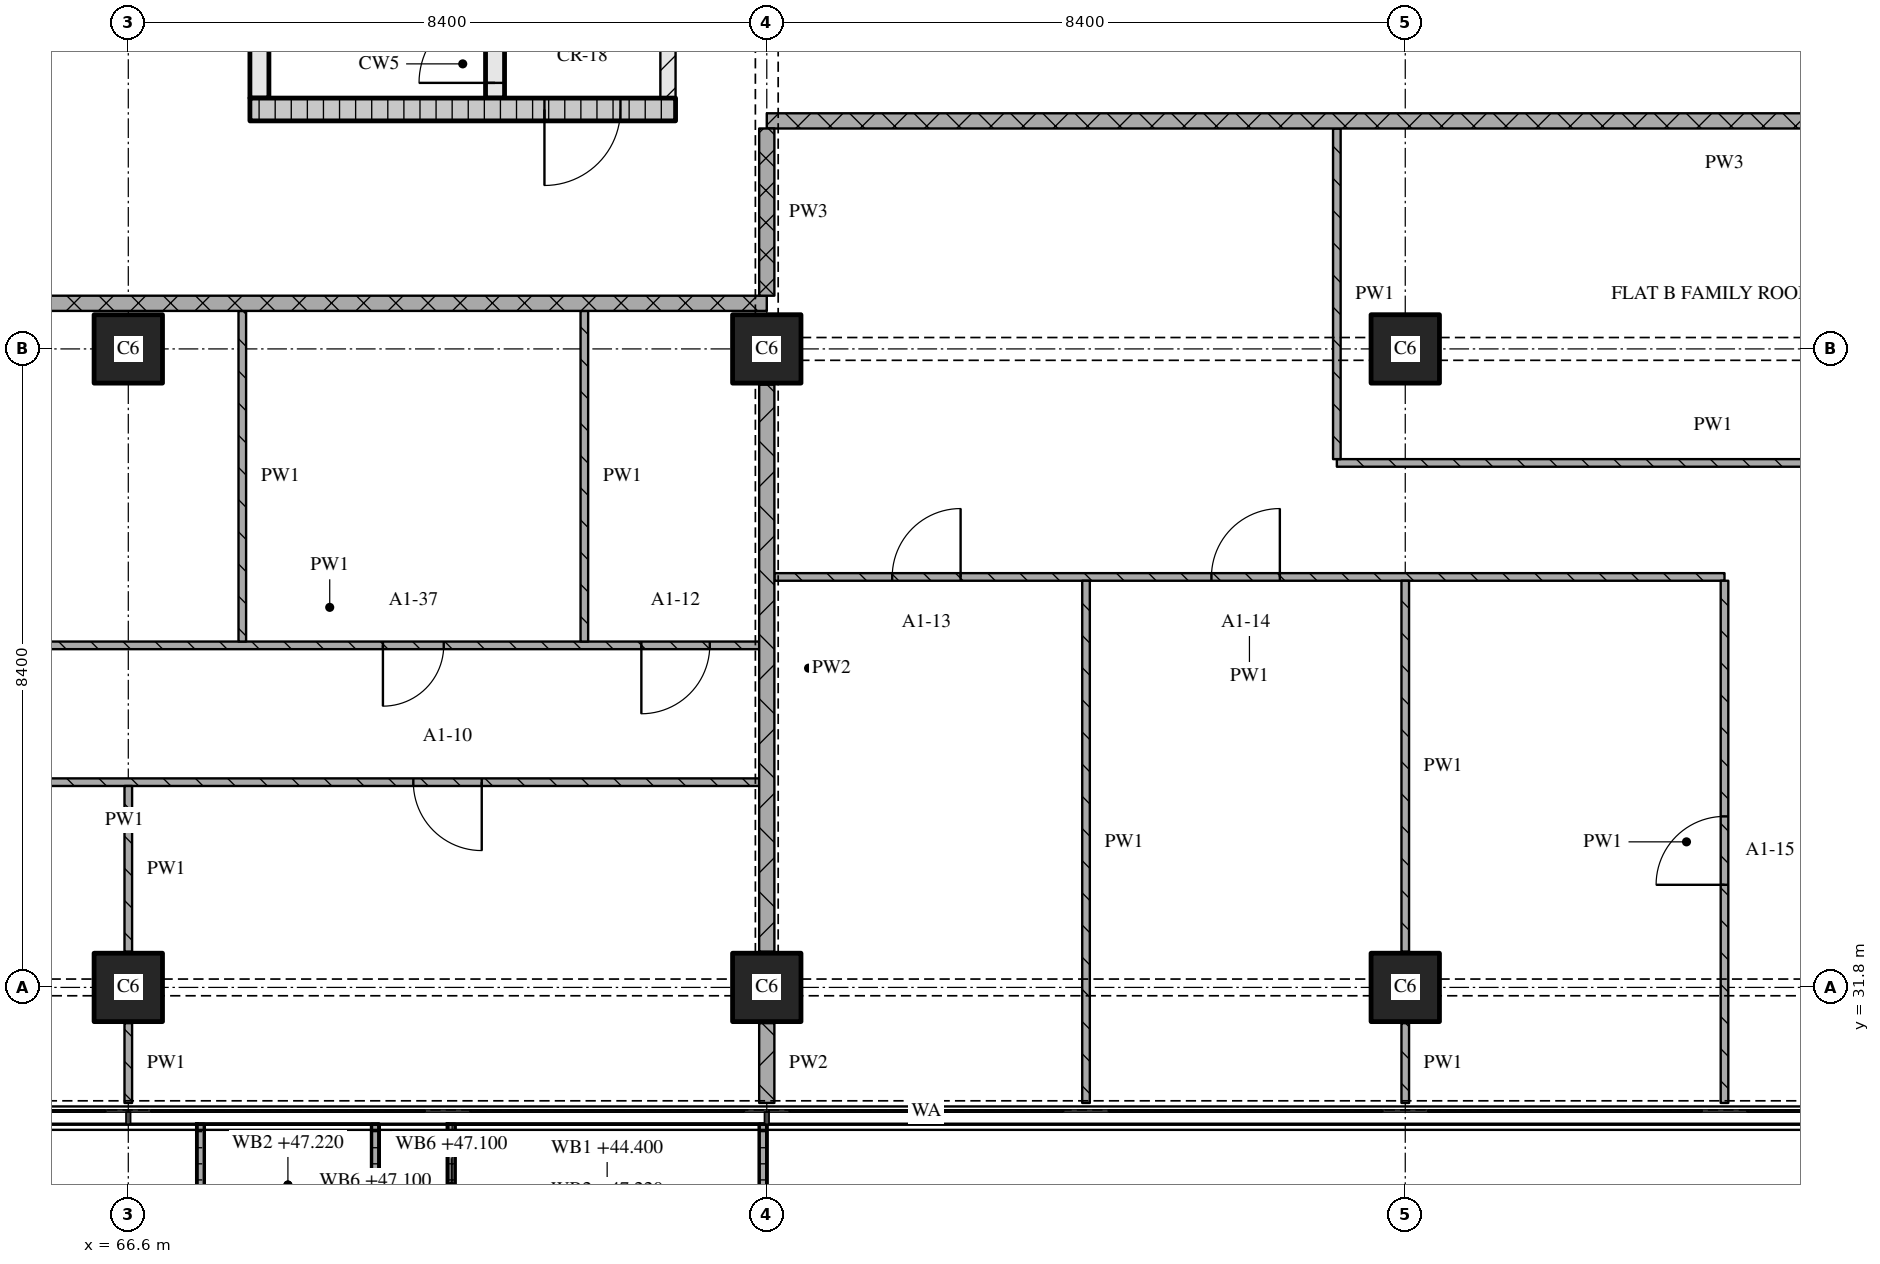
"""IFC4 building model, lengths in metres.
Left out: names, types, materials, properties, quantities, classifications, styles, units other than length and angle.
Written with IfcOpenShell. Run it as: python <this file> out.ifc"""

import sys

from ifc_helpers import new_model, si_unit, direction, frame, frame_2d, origin, origin_2d, place, context, subcontext, project, spatial, polyline, rectangle, outline, extrude, element, fill, save


model = new_model("IFC4")
c1 = context("Model", 3, precision=1e-05, world=origin(), true_north=direction((0.0, 1.0)))
c2 = subcontext(c1, "Body", "Model", "MODEL_VIEW")
j1 = project(units=[si_unit("LENGTHUNIT", "METRE"), si_unit("PLANEANGLEUNIT", "RADIAN")], contexts=[c1])
p1 = place(None, origin())
s1 = spatial("IfcSite", under=j1, at=p1, CompositionType="ELEMENT")
p2 = place(p1, origin())
s2 = spatial("IfcBuilding", under=s1, at=p2, CompositionType="ELEMENT")
p3 = place(p2, frame((0.0, 0.0, 44.4)))
s3 = spatial("IfcBuildingStorey", under=s2, at=p3, CompositionType="ELEMENT", Elevation=44.4)
for number, where, z_axis, x_axis in (
    (1, (66.6, 31.8, 0.0), (0.0, 0.0, 1.0), (1.0, 0.0, 0.0)),
    (2, (66.6, 40.2, 0.0), (0.0, 0.0, 1.0), (1.0, 0.0, 0.0)),
    (3, (75.0, 31.8, 0.0), (0.0, 0.0, 1.0), (1.0, 0.0, 0.0)),
    (4, (75.0, 40.2, 0.0), (0.0, 0.0, 1.0), (1.0, 0.0, 0.0)),
    (5, (83.4, 31.8, 0.0), (0.0, 0.0, 1.0), (1.0, 0.0, 0.0)),
    (6, (83.4, 40.2, 0.0), (0.0, 0.0, 1.0), (1.0, 0.0, 0.0)),
):
    element("IfcColumn", number, at=place(p3, frame(where, z_axis=z_axis, x_axis=x_axis)), inside=s3, PredefinedType="COLUMN", context=c2, shape_type="SweptSolid", body=[
        extrude(rectangle(XDim=0.9, YDim=0.9, at=origin_2d()), origin(), (0.0, 0.0, 1.0), 3.6),
    ])
p4 = place(p3, origin())
e7 = element("IfcWall", 7, at=p4, inside=s3, PredefinedType="SOLIDWALL", context=c2, shape_type="SweptSolid", body=[
    extrude(outline(polyline([(67.5, 30.0), (67.6, 30.0), (67.6, 28.5), (69.8, 28.5), (69.8, 30.0), (69.9, 30.0), (69.9, 28.4), (67.5, 28.4), (67.5, 30.0)])), origin(), (0.0, 0.0, 1.0), 1.0),
])
p5 = place(p3, origin())
e8 = element("IfcWall", 8, at=p5, inside=s3, PredefinedType="SOLIDWALL", context=c2, shape_type="SweptSolid", body=[
    extrude(outline(polyline([(70.8, 30.0), (70.9, 30.0), (70.9, 28.367), (74.9, 28.367), (74.9, 30.0), (75.0, 30.0), (75.0, 28.267), (70.8, 28.267), (70.8, 30.0)])), origin(), (0.0, 0.0, 1.0), 1.0),
])
p6 = place(p3, frame((68.2, 43.35, 0.0), z_axis=(0.0, 0.0, 1.0), x_axis=(1.0, 0.0, 0.0)))
e9 = element("IfcWall", 9, at=p6, inside=s3, PredefinedType="SOLIDWALL", context=c2, shape_type="SweptSolid", body=[
    extrude(rectangle(XDim=5.6, YDim=0.3, at=frame_2d((2.8, 0.0))), origin(), (0.0, 0.0, 1.0), 3.32),
])
p7 = place(p6, frame((3.875, 0.0, 0.0)))
e10 = element("IfcOpeningElement", 10, at=p7, cuts=e9, PredefinedType="OPENING", context=c2, shape_type="SweptSolid", body=[
    extrude(rectangle(XDim=1.0, YDim=2.1, at=frame_2d((0.5, 1.05))), frame((0.0, 0.16, 0.0), z_axis=(0.0, -1.0, 0.0), x_axis=(1.0, 0.0, 0.0)), (0.0, 0.0, 1.0), 0.32),
])
p8 = place(p3, frame((68.325, 43.5, 0.0), z_axis=(0.0, 0.0, 1.0), x_axis=(0.0, 1.0, 0.0)))
e11 = element("IfcWall", 11, at=p8, inside=s3, PredefinedType="SOLIDWALL", context=c2, shape_type="SweptSolid", body=[
    extrude(rectangle(XDim=6.9, YDim=0.25, at=frame_2d((3.45, 0.0))), origin(), (0.0, 0.0, 1.0), 3.32),
])
p9 = place(p3, frame((71.425, 43.5, 0.0), z_axis=(0.0, 0.0, 1.0), x_axis=(0.0, 1.0, 0.0)))
e12 = element("IfcWall", 12, at=p9, inside=s3, PredefinedType="SOLIDWALL", context=c2, shape_type="SweptSolid", body=[
    extrude(rectangle(XDim=6.9, YDim=0.25, at=frame_2d((3.45, 0.0))), origin(), (0.0, 0.0, 1.0), 3.32),
])
p10 = place(p9, frame((0.2, 0.0, 0.0)))
e13 = element("IfcOpeningElement", 13, at=p10, cuts=e12, PredefinedType="OPENING", context=c2, shape_type="SweptSolid", body=[
    extrude(rectangle(XDim=1.0, YDim=2.1, at=frame_2d((0.5, 1.05))), frame((0.0, 0.135, 0.0), z_axis=(0.0, -1.0, 0.0), x_axis=(1.0, 0.0, 0.0)), (0.0, 0.0, 1.0), 0.27),
])
p11 = place(p3, frame((73.7, 43.5, 0.0), z_axis=(0.0, 0.0, 1.0), x_axis=(0.0, 1.0, 0.0)))
e14 = element("IfcWall", 14, at=p11, inside=s3, PredefinedType="PARTITIONING", context=c2, shape_type="SweptSolid", body=[
    extrude(rectangle(XDim=6.9, YDim=0.2, at=frame_2d((3.45, 0.0))), origin(), (0.0, 0.0, 1.0), 3.32),
])
p12 = place(p11, frame((1.0, 0.0, 0.0)))
e15 = element("IfcOpeningElement", 15, at=p12, cuts=e14, PredefinedType="OPENING", context=c2, shape_type="SweptSolid", body=[
    extrude(rectangle(XDim=1.0, YDim=2.1, at=frame_2d((0.5, 1.05))), frame((0.0, 0.11, 0.0), z_axis=(0.0, -1.0, 0.0), x_axis=(1.0, 0.0, 0.0)), (0.0, 0.0, 1.0), 0.22),
])
p13 = place(p3, frame((74.9, 34.5, 0.0), z_axis=(0.0, 0.0, 1.0), x_axis=(-1.0, 0.0, 0.0)))
e16 = element("IfcWall", 16, at=p13, inside=s3, PredefinedType="PARTITIONING", context=c2, shape_type="SweptSolid", body=[
    extrude(rectangle(XDim=16.7, YDim=0.1, at=frame_2d((8.35, 0.0))), origin(), (0.0, 0.0, 1.0), 3.32),
])
p14 = place(p13, frame((3.65, 0.0, 0.0)))
e17 = element("IfcOpeningElement", 17, at=p14, cuts=e16, PredefinedType="OPENING", context=c2, shape_type="SweptSolid", body=[
    extrude(rectangle(XDim=0.9, YDim=2.1, at=frame_2d((0.45, 1.05))), frame((0.0, 0.06, 0.0), z_axis=(0.0, -1.0, 0.0), x_axis=(1.0, 0.0, 0.0)), (0.0, 0.0, 1.0), 0.12),
])
p15 = place(p13, frame((12.05, 0.0, 0.0)))
e18 = element("IfcOpeningElement", 18, at=p15, cuts=e16, PredefinedType="OPENING", context=c2, shape_type="SweptSolid", body=[
    extrude(rectangle(XDim=0.9, YDim=2.1, at=frame_2d((0.45, 1.05))), frame((0.0, 0.06, 0.0), z_axis=(0.0, -1.0, 0.0), x_axis=(1.0, 0.0, 0.0)), (0.0, 0.0, 1.0), 0.12),
])
p16 = place(p3, frame((63.6, 36.3, 0.0), z_axis=(0.0, 0.0, 1.0), x_axis=(1.0, 0.0, 0.0)))
e19 = element("IfcWall", 19, at=p16, inside=s3, PredefinedType="PARTITIONING", context=c2, shape_type="SweptSolid", body=[
    extrude(rectangle(XDim=11.3, YDim=0.1, at=frame_2d((5.65, 0.0))), origin(), (0.0, 0.0, 1.0), 3.32),
])
p17 = place(p16, frame((6.35, 0.0, 0.0)))
e20 = element("IfcOpeningElement", 20, at=p17, cuts=e19, PredefinedType="OPENING", context=c2, shape_type="SweptSolid", body=[
    extrude(rectangle(XDim=0.8, YDim=2.1, at=frame_2d((0.4, 1.05))), frame((0.0, 0.06, 0.0), z_axis=(0.0, -1.0, 0.0), x_axis=(1.0, 0.0, 0.0)), (0.0, 0.0, 1.0), 0.12),
])
p18 = place(p16, frame((9.75, 0.0, 0.0)))
e21 = element("IfcOpeningElement", 21, at=p18, cuts=e19, PredefinedType="OPENING", context=c2, shape_type="SweptSolid", body=[
    extrude(rectangle(XDim=0.9, YDim=2.1, at=frame_2d((0.45, 1.05))), frame((0.0, 0.06, 0.0), z_axis=(0.0, -1.0, 0.0), x_axis=(1.0, 0.0, 0.0)), (0.0, 0.0, 1.0), 0.12),
])
p19 = place(p3, frame((87.6, 37.2, 0.0), z_axis=(0.0, 0.0, 1.0), x_axis=(-1.0, 0.0, 0.0)))
e22 = element("IfcWall", 22, at=p19, inside=s3, PredefinedType="PARTITIONING", context=c2, shape_type="SweptSolid", body=[
    extrude(rectangle(XDim=12.5, YDim=0.1, at=frame_2d((6.25, 0.0))), origin(), (0.0, 0.0, 1.0), 3.32),
])
p20 = place(p19, frame((5.85, 0.0, 0.0)))
e23 = element("IfcOpeningElement", 23, at=p20, cuts=e22, PredefinedType="OPENING", context=c2, shape_type="SweptSolid", body=[
    extrude(rectangle(XDim=0.9, YDim=2.1, at=frame_2d((0.45, 1.05))), frame((0.0, 0.06, 0.0), z_axis=(0.0, -1.0, 0.0), x_axis=(1.0, 0.0, 0.0)), (0.0, 0.0, 1.0), 0.12),
])
p21 = place(p19, frame((10.05, 0.0, 0.0)))
e24 = element("IfcOpeningElement", 24, at=p21, cuts=e22, PredefinedType="OPENING", context=c2, shape_type="SweptSolid", body=[
    extrude(rectangle(XDim=0.9, YDim=2.1, at=frame_2d((0.45, 1.05))), frame((0.0, 0.06, 0.0), z_axis=(0.0, -1.0, 0.0), x_axis=(1.0, 0.0, 0.0)), (0.0, 0.0, 1.0), 0.12),
])
p22 = place(p3, frame((82.5, 38.7, 0.0), z_axis=(0.0, 0.0, 1.0), x_axis=(1.0, 0.0, 0.0)))
e25 = element("IfcWall", 25, at=p22, inside=s3, PredefinedType="PARTITIONING", context=c2, shape_type="SweptSolid", body=[
    extrude(rectangle(XDim=9.9, YDim=0.1, at=frame_2d((4.95, 0.0))), origin(), (0.0, 0.0, 1.0), 3.32),
])
p23 = place(p3, frame((75.0, 40.8, 0.0), z_axis=(0.0, 0.0, 1.0), x_axis=(-1.0, 0.0, 0.0)))
e26 = element("IfcWall", 26, at=p23, inside=s3, PredefinedType="PARTITIONING", context=c2, shape_type="SweptSolid", body=[
    extrude(rectangle(XDim=24.08, YDim=0.2, at=frame_2d((12.04, 0.0))), origin(), (0.0, 0.0, 1.0), 3.32),
])
p24 = place(p23, frame((11.65, 0.0, 0.0)))
e27 = element("IfcOpeningElement", 27, at=p24, cuts=e26, PredefinedType="OPENING", context=c2, shape_type="SweptSolid", body=[
    extrude(rectangle(XDim=1.0, YDim=2.1, at=frame_2d((0.5, 1.05))), frame((0.0, 0.11, 0.0), z_axis=(0.0, -1.0, 0.0), x_axis=(1.0, 0.0, 0.0)), (0.0, 0.0, 1.0), 0.22),
])
p25 = place(p3, frame((100.2, 43.2, 0.0), z_axis=(0.0, 0.0, 1.0), x_axis=(-1.0, 0.0, 0.0)))
e28 = element("IfcWall", 28, at=p25, inside=s3, PredefinedType="PARTITIONING", context=c2, shape_type="SweptSolid", body=[
    extrude(rectangle(XDim=25.2, YDim=0.2, at=frame_2d((12.6, 0.0))), origin(), (0.0, 0.0, 1.0), 3.32),
])
p26 = place(p25, frame((6.55, 0.0, 0.0)))
e29 = element("IfcOpeningElement", 29, at=p26, cuts=e28, PredefinedType="OPENING", context=c2, shape_type="SweptSolid", body=[
    extrude(rectangle(XDim=1.0, YDim=2.1, at=frame_2d((0.5, 1.05))), frame((0.0, 0.11, 0.0), z_axis=(0.0, -1.0, 0.0), x_axis=(1.0, 0.0, 0.0)), (0.0, 0.0, 1.0), 0.22),
])
p27 = place(p3, frame((66.6, 31.33, 0.0), z_axis=(0.0, 0.0, 1.0), x_axis=(0.0, -1.0, 0.0)))
e30 = element("IfcWall", 30, at=p27, inside=s3, PredefinedType="PARTITIONING", context=c2, shape_type="SweptSolid", body=[
    extrude(rectangle(XDim=1.05, YDim=0.1, at=frame_2d((0.525, 0.0))), origin(), (0.0, 0.0, 1.0), 3.32),
])
p28 = place(p3, frame((66.6, 34.45, 0.0), z_axis=(0.0, 0.0, 1.0), x_axis=(0.0, -1.0, 0.0)))
e31 = element("IfcWall", 31, at=p28, inside=s3, PredefinedType="PARTITIONING", context=c2, shape_type="SweptSolid", body=[
    extrude(rectangle(XDim=2.18, YDim=0.1, at=frame_2d((1.09, 0.0))), origin(), (0.0, 0.0, 1.0), 3.32),
])
for number, where, z_axis, x_axis in (
    (32, (68.1, 40.7, 0.0), (0.0, 0.0, 1.0), (0.0, -1.0, 0.0)),
    (33, (72.6, 40.7, 0.0), (0.0, 0.0, 1.0), (0.0, -1.0, 0.0)),
):
    element("IfcWall", number, at=place(p3, frame(where, z_axis=z_axis, x_axis=x_axis)), inside=s3, PredefinedType="PARTITIONING", context=c2, shape_type="SweptSolid", body=[
        extrude(rectangle(XDim=4.35, YDim=0.1, at=frame_2d((2.175, 0.0))), origin(), (0.0, 0.0, 1.0), 3.32),
    ])
p29 = place(p3, frame((75.0, 43.1, 0.0), z_axis=(0.0, 0.0, 1.0), x_axis=(0.0, -1.0, 0.0)))
e34 = element("IfcWall", 34, at=p29, inside=s3, PredefinedType="PARTITIONING", context=c2, shape_type="SweptSolid", body=[
    extrude(rectangle(XDim=2.2, YDim=0.2, at=frame_2d((1.1, 0.0))), origin(), (0.0, 0.0, 1.0), 2.43),
])
p30 = place(p3, frame((75.0, 31.33, 0.0), z_axis=(0.0, 0.0, 1.0), x_axis=(0.0, -1.0, 0.0)))
e35 = element("IfcWall", 35, at=p30, inside=s3, PredefinedType="PARTITIONING", context=c2, shape_type="SweptSolid", body=[
    extrude(rectangle(XDim=1.05, YDim=0.2, at=frame_2d((0.525, 0.0))), origin(), (0.0, 0.0, 1.0), 3.32),
])
p31 = place(p3, frame((75.0, 39.73, 0.0), z_axis=(0.0, 0.0, 1.0), x_axis=(0.0, -1.0, 0.0)))
e36 = element("IfcWall", 36, at=p31, inside=s3, PredefinedType="PARTITIONING", context=c2, shape_type="SweptSolid", body=[
    extrude(rectangle(XDim=7.46, YDim=0.2, at=frame_2d((3.73, 0.0))), origin(), (0.0, 0.0, 1.0), 2.83),
])
p32 = place(p3, frame((79.2, 37.15, 0.0), z_axis=(0.0, 0.0, 1.0), x_axis=(0.0, -1.0, 0.0)))
e37 = element("IfcWall", 37, at=p32, inside=s3, PredefinedType="PARTITIONING", context=c2, shape_type="SweptSolid", body=[
    extrude(rectangle(XDim=6.87, YDim=0.1, at=frame_2d((3.435, 0.0))), origin(), (0.0, 0.0, 1.0), 3.32),
])
p33 = place(p3, frame((82.5, 43.1, 0.0), z_axis=(0.0, 0.0, 1.0), x_axis=(0.0, -1.0, 0.0)))
e38 = element("IfcWall", 38, at=p33, inside=s3, PredefinedType="PARTITIONING", context=c2, shape_type="SweptSolid", body=[
    extrude(rectangle(XDim=4.35, YDim=0.1, at=frame_2d((2.175, 0.0))), origin(), (0.0, 0.0, 1.0), 3.32),
])
p34 = place(p3, frame((83.4, 31.33, 0.0), z_axis=(0.0, 0.0, 1.0), x_axis=(0.0, -1.0, 0.0)))
e39 = element("IfcWall", 39, at=p34, inside=s3, PredefinedType="PARTITIONING", context=c2, shape_type="SweptSolid", body=[
    extrude(rectangle(XDim=1.05, YDim=0.1, at=frame_2d((0.525, 0.0))), origin(), (0.0, 0.0, 1.0), 3.32),
])
p35 = place(p3, frame((83.4, 37.15, 0.0), z_axis=(0.0, 0.0, 1.0), x_axis=(0.0, -1.0, 0.0)))
e40 = element("IfcWall", 40, at=p35, inside=s3, PredefinedType="PARTITIONING", context=c2, shape_type="SweptSolid", body=[
    extrude(rectangle(XDim=4.88, YDim=0.1, at=frame_2d((2.44, 0.0))), origin(), (0.0, 0.0, 1.0), 3.32),
])
p36 = place(p3, frame((87.6, 30.28, 0.0), z_axis=(0.0, 0.0, 1.0), x_axis=(0.0, 1.0, 0.0)))
e41 = element("IfcWall", 41, at=p36, inside=s3, PredefinedType="PARTITIONING", context=c2, shape_type="SweptSolid", body=[
    extrude(rectangle(XDim=6.87, YDim=0.1, at=frame_2d((3.435, 0.0))), origin(), (0.0, 0.0, 1.0), 3.32),
])
p37 = place(p36, frame((2.87, 0.0, 0.0)))
e42 = element("IfcOpeningElement", 42, at=p37, cuts=e41, PredefinedType="OPENING", context=c2, shape_type="SweptSolid", body=[
    extrude(rectangle(XDim=0.9, YDim=2.1, at=frame_2d((0.45, 1.05))), frame((0.0, 0.06, 0.0), z_axis=(0.0, -1.0, 0.0), x_axis=(1.0, 0.0, 0.0)), (0.0, 0.0, 1.0), 0.12),
])
p38 = place(p7, origin())
e43 = element("IfcDoor", 43, at=p38, inside=s3, OperationType="SINGLE_SWING_RIGHT", PredefinedType="DOOR", context=c2, shape_type="SweptSolid", body=[
    extrude(rectangle(XDim=1.0, YDim=2.1, at=frame_2d((0.5, 1.05))), frame((0.0, 0.025, 0.0), z_axis=(0.0, -1.0, 0.0), x_axis=(1.0, 0.0, 0.0)), (0.0, 0.0, 1.0), 0.05),
])
fill(e10, e43)
p39 = place(p10, origin())
e44 = element("IfcDoor", 44, at=p39, inside=s3, OperationType="SINGLE_SWING_LEFT", PredefinedType="DOOR", context=c2, shape_type="SweptSolid", body=[
    extrude(rectangle(XDim=1.0, YDim=2.1, at=frame_2d((0.5, 1.05))), frame((0.0, 0.025, 0.0), z_axis=(0.0, -1.0, 0.0), x_axis=(1.0, 0.0, 0.0)), (0.0, 0.0, 1.0), 0.05),
])
fill(e13, e44)
p40 = place(p14, origin())
e45 = element("IfcDoor", 45, at=p40, inside=s3, OperationType="SINGLE_SWING_LEFT", PredefinedType="DOOR", context=c2, shape_type="SweptSolid", body=[
    extrude(rectangle(XDim=0.9, YDim=2.1, at=frame_2d((0.45, 1.05))), frame((0.0, 0.025, 0.0), z_axis=(0.0, -1.0, 0.0), x_axis=(1.0, 0.0, 0.0)), (0.0, 0.0, 1.0), 0.05),
])
fill(e17, e45)
p41 = place(p17, origin())
e46 = element("IfcDoor", 46, at=p41, inside=s3, OperationType="SINGLE_SWING_RIGHT", PredefinedType="DOOR", context=c2, shape_type="SweptSolid", body=[
    extrude(rectangle(XDim=0.8, YDim=2.1, at=frame_2d((0.4, 1.05))), frame((0.0, 0.025, 0.0), z_axis=(0.0, -1.0, 0.0), x_axis=(1.0, 0.0, 0.0)), (0.0, 0.0, 1.0), 0.05),
])
fill(e20, e46)
p42 = place(p18, origin())
e47 = element("IfcDoor", 47, at=p42, inside=s3, OperationType="SINGLE_SWING_RIGHT", PredefinedType="DOOR", context=c2, shape_type="SweptSolid", body=[
    extrude(rectangle(XDim=0.9, YDim=2.1, at=frame_2d((0.45, 1.05))), frame((0.0, 0.025, 0.0), z_axis=(0.0, -1.0, 0.0), x_axis=(1.0, 0.0, 0.0)), (0.0, 0.0, 1.0), 0.05),
])
fill(e21, e47)
p43 = place(p20, origin())
e48 = element("IfcDoor", 48, at=p43, inside=s3, OperationType="SINGLE_SWING_RIGHT", PredefinedType="DOOR", context=c2, shape_type="SweptSolid", body=[
    extrude(rectangle(XDim=0.9, YDim=2.1, at=frame_2d((0.45, 1.05))), frame((0.0, 0.025, 0.0), z_axis=(0.0, -1.0, 0.0), x_axis=(1.0, 0.0, 0.0)), (0.0, 0.0, 1.0), 0.05),
])
fill(e23, e48)
p44 = place(p21, origin())
e49 = element("IfcDoor", 49, at=p44, inside=s3, OperationType="SINGLE_SWING_RIGHT", PredefinedType="DOOR", context=c2, shape_type="SweptSolid", body=[
    extrude(rectangle(XDim=0.9, YDim=2.1, at=frame_2d((0.45, 1.05))), frame((0.0, 0.025, 0.0), z_axis=(0.0, -1.0, 0.0), x_axis=(1.0, 0.0, 0.0)), (0.0, 0.0, 1.0), 0.05),
])
fill(e24, e49)
p45 = place(p37, origin())
e50 = element("IfcDoor", 50, at=p45, inside=s3, OperationType="SINGLE_SWING_LEFT", PredefinedType="DOOR", context=c2, shape_type="SweptSolid", body=[
    extrude(rectangle(XDim=0.9, YDim=2.1, at=frame_2d((0.45, 1.05))), frame((0.0, 0.025, 0.0), z_axis=(0.0, -1.0, 0.0), x_axis=(1.0, 0.0, 0.0)), (0.0, 0.0, 1.0), 0.05),
])
fill(e42, e50)
save(model, sys.argv[1])
